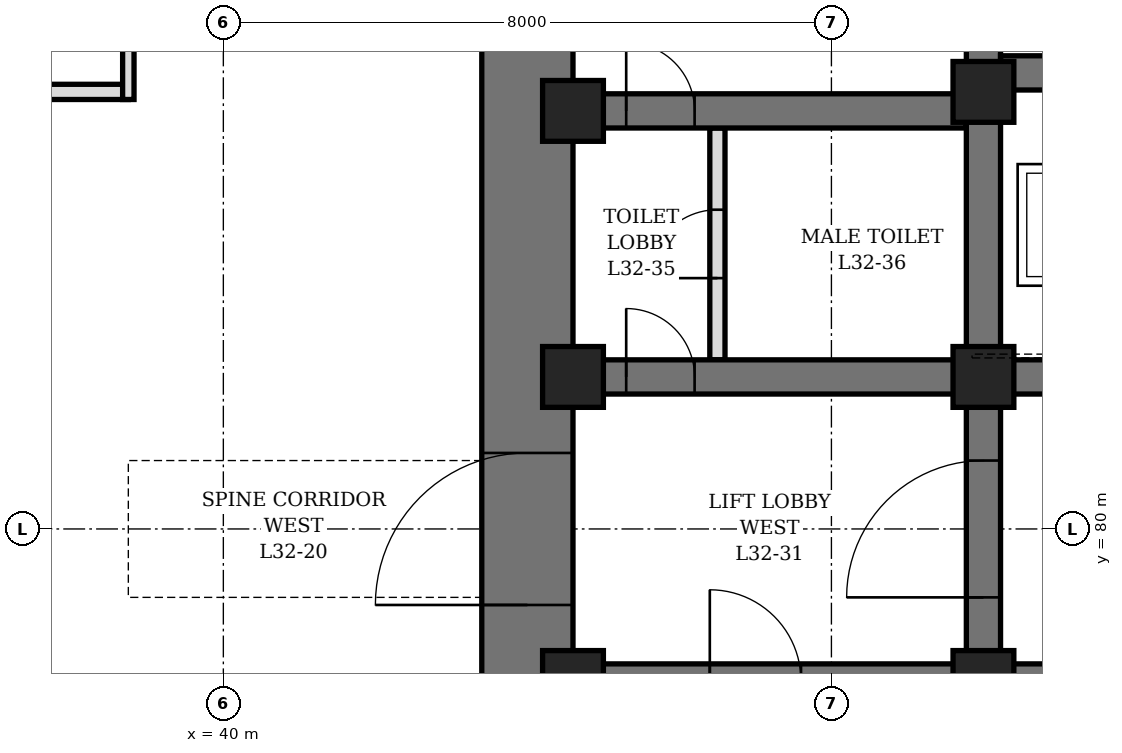
"""IFC4 building model, lengths in metres.
Left out: names, types, materials, properties, quantities, classifications, styles, units other than length and angle.
Written with IfcOpenShell. Run it as: python <this file> out.ifc"""

import sys

from ifc_helpers import new_model, si_unit, direction, frame, frame_2d, origin, origin_2d, place, context, subcontext, project, spatial, rectangle, hollow_rectangle, extrude, element, fill, save


model = new_model("IFC4")
c1 = context("Model", 3, precision=1e-05, world=origin(), true_north=direction((0.0, 1.0)))
c2 = subcontext(c1, "Body", "Model", "MODEL_VIEW")
j1 = project(units=[si_unit("LENGTHUNIT", "METRE"), si_unit("PLANEANGLEUNIT", "RADIAN")], contexts=[c1])
p1 = place(None, origin())
s1 = spatial("IfcSite", under=j1, at=p1, CompositionType="ELEMENT")
p2 = place(p1, origin())
s2 = spatial("IfcBuilding", under=s1, at=p2, CompositionType="ELEMENT")
p3 = place(p2, frame((0.0, 0.0, 145.9)))
s3 = spatial("IfcBuildingStorey", under=s2, at=p3, CompositionType="ELEMENT", Elevation=145.9)
p4 = place(p3, frame((44.0, 70.4, 0.0), z_axis=(0.0, 0.0, 1.0), x_axis=(0.0, 1.0, 0.0)))
e1 = element("IfcWall", 1, at=p4, inside=s3, PredefinedType="SHEAR", context=c2, shape_type="SweptSolid", body=[
    extrude(rectangle(XDim=19.2, YDim=1.2, at=frame_2d((9.6, 0.0))), origin(), (0.0, 0.0, 1.0), 4.2),
])
p5 = place(p4, frame((8.6, 0.0, 0.0)))
e2 = element("IfcOpeningElement", 2, at=p5, cuts=e1, PredefinedType="OPENING", context=c2, shape_type="SweptSolid", body=[
    extrude(rectangle(XDim=2.0, YDim=2.4, at=frame_2d((1.0, 1.2))), frame((0.0, 0.61, 0.0), z_axis=(0.0, -1.0, 0.0), x_axis=(1.0, 0.0, 0.0)), (0.0, 0.0, 1.0), 1.22),
])
p6 = place(p3, frame((50.0, 71.6, 0.0), z_axis=(0.0, 0.0, 1.0), x_axis=(0.0, 1.0, 0.0)))
e3 = element("IfcWall", 3, at=p6, inside=s3, PredefinedType="SHEAR", context=c2, shape_type="SweptSolid", body=[
    extrude(rectangle(XDim=16.8, YDim=0.45, at=frame_2d((8.4, 0.0))), origin(), (0.0, 0.0, 1.0), 4.2),
])
p7 = place(p6, frame((7.5, 0.0, 0.0)))
e4 = element("IfcOpeningElement", 4, at=p7, cuts=e3, PredefinedType="OPENING", context=c2, shape_type="SweptSolid", body=[
    extrude(rectangle(XDim=1.8, YDim=2.4, at=frame_2d((0.9, 1.2))), frame((0.0, 0.235, 0.0), z_axis=(0.0, -1.0, 0.0), x_axis=(1.0, 0.0, 0.0)), (0.0, 0.0, 1.0), 0.47),
])
p8 = place(p3, frame((44.6, 78.0, 0.0), z_axis=(0.0, 0.0, 1.0), x_axis=(1.0, 0.0, 0.0)))
e5 = element("IfcWall", 5, at=p8, inside=s3, PredefinedType="SHEAR", context=c2, shape_type="SweptSolid", body=[
    extrude(rectangle(XDim=5.175, YDim=0.45, at=frame_2d((2.587, 0.0))), origin(), (0.0, 0.0, 1.0), 4.2),
])
p9 = place(p8, frame((1.8, 0.0, 0.0)))
e6 = element("IfcOpeningElement", 6, at=p9, cuts=e5, PredefinedType="OPENING", context=c2, shape_type="SweptSolid", body=[
    extrude(rectangle(XDim=1.2, YDim=2.1, at=frame_2d((0.6, 1.05))), frame((0.0, 0.235, 0.0), z_axis=(0.0, -1.0, 0.0), x_axis=(1.0, 0.0, 0.0)), (0.0, 0.0, 1.0), 0.47),
])
p10 = place(p3, frame((44.6, 82.0, 0.0), z_axis=(0.0, 0.0, 1.0), x_axis=(1.0, 0.0, 0.0)))
e7 = element("IfcWall", 7, at=p10, inside=s3, PredefinedType="SHEAR", context=c2, shape_type="SweptSolid", body=[
    extrude(rectangle(XDim=5.175, YDim=0.45, at=frame_2d((2.587, 0.0))), origin(), (0.0, 0.0, 1.0), 4.2),
])
p11 = place(p10, frame((0.7, 0.0, 0.0)))
e8 = element("IfcOpeningElement", 8, at=p11, cuts=e7, PredefinedType="OPENING", context=c2, shape_type="SweptSolid", body=[
    extrude(rectangle(XDim=0.9, YDim=2.1, at=frame_2d((0.45, 1.05))), frame((0.0, 0.235, 0.0), z_axis=(0.0, -1.0, 0.0), x_axis=(1.0, 0.0, 0.0)), (0.0, 0.0, 1.0), 0.47),
])
p12 = place(p3, frame((44.6, 85.5, 0.0), z_axis=(0.0, 0.0, 1.0), x_axis=(1.0, 0.0, 0.0)))
e9 = element("IfcWall", 9, at=p12, inside=s3, PredefinedType="SHEAR", context=c2, shape_type="SweptSolid", body=[
    extrude(rectangle(XDim=5.175, YDim=0.45, at=frame_2d((2.587, 0.0))), origin(), (0.0, 0.0, 1.0), 4.2),
])
p13 = place(p12, frame((0.7, 0.0, 0.0)))
e10 = element("IfcOpeningElement", 10, at=p13, cuts=e9, PredefinedType="OPENING", context=c2, shape_type="SweptSolid", body=[
    extrude(rectangle(XDim=0.9, YDim=2.1, at=frame_2d((0.45, 1.05))), frame((0.0, 0.235, 0.0), z_axis=(0.0, -1.0, 0.0), x_axis=(1.0, 0.0, 0.0)), (0.0, 0.0, 1.0), 0.47),
])
p14 = place(p3, frame((50.225, 78.0, 0.0), z_axis=(0.0, 0.0, 1.0), x_axis=(1.0, 0.0, 0.0)))
e11 = element("IfcWall", 11, at=p14, inside=s3, PredefinedType="SHEAR", context=c2, shape_type="SweptSolid", body=[
    extrude(rectangle(XDim=11.55, YDim=0.45, at=frame_2d((5.775, 0.0))), origin(), (0.0, 0.0, 1.0), 4.2),
])
p15 = place(p14, frame((0.825, 0.0, 0.0)))
e12 = element("IfcOpeningElement", 12, at=p15, cuts=e11, PredefinedType="OPENING", context=c2, shape_type="SweptSolid", body=[
    extrude(rectangle(XDim=0.9, YDim=2.1, at=frame_2d((0.45, 1.05))), frame((0.0, 0.235, 0.0), z_axis=(0.0, -1.0, 0.0), x_axis=(1.0, 0.0, 0.0)), (0.0, 0.0, 1.0), 0.47),
])
p16 = place(p14, frame((3.825, 0.0, 0.0)))
e13 = element("IfcOpeningElement", 13, at=p16, cuts=e11, PredefinedType="OPENING", context=c2, shape_type="SweptSolid", body=[
    extrude(rectangle(XDim=0.9, YDim=2.1, at=frame_2d((0.45, 1.05))), frame((0.0, 0.235, 0.0), z_axis=(0.0, -1.0, 0.0), x_axis=(1.0, 0.0, 0.0)), (0.0, 0.0, 1.0), 0.47),
])
p17 = place(p14, frame((6.825, 0.0, 0.0)))
e14 = element("IfcOpeningElement", 14, at=p17, cuts=e11, PredefinedType="OPENING", context=c2, shape_type="SweptSolid", body=[
    extrude(rectangle(XDim=0.9, YDim=2.1, at=frame_2d((0.45, 1.05))), frame((0.0, 0.235, 0.0), z_axis=(0.0, -1.0, 0.0), x_axis=(1.0, 0.0, 0.0)), (0.0, 0.0, 1.0), 0.47),
])
p18 = place(p14, frame((9.825, 0.0, 0.0)))
e15 = element("IfcOpeningElement", 15, at=p18, cuts=e11, PredefinedType="OPENING", context=c2, shape_type="SweptSolid", body=[
    extrude(rectangle(XDim=0.9, YDim=2.1, at=frame_2d((0.45, 1.05))), frame((0.0, 0.235, 0.0), z_axis=(0.0, -1.0, 0.0), x_axis=(1.0, 0.0, 0.0)), (0.0, 0.0, 1.0), 0.47),
])
p19 = place(p3, frame((50.225, 82.0, 0.0), z_axis=(0.0, 0.0, 1.0), x_axis=(1.0, 0.0, 0.0)))
e16 = element("IfcWall", 16, at=p19, inside=s3, PredefinedType="SHEAR", context=c2, shape_type="SweptSolid", body=[
    extrude(rectangle(XDim=11.55, YDim=0.45, at=frame_2d((5.775, 0.0))), origin(), (0.0, 0.0, 1.0), 4.2),
])
p20 = place(p19, frame((0.725, 0.0, 0.0)))
e17 = element("IfcOpeningElement", 17, at=p20, cuts=e16, PredefinedType="OPENING", context=c2, shape_type="SweptSolid", body=[
    extrude(rectangle(XDim=1.1, YDim=2.2, at=frame_2d((0.55, 1.1))), frame((0.0, 0.235, 0.0), z_axis=(0.0, -1.0, 0.0), x_axis=(1.0, 0.0, 0.0)), (0.0, 0.0, 1.0), 0.47),
])
p21 = place(p19, frame((3.725, 0.0, 0.0)))
e18 = element("IfcOpeningElement", 18, at=p21, cuts=e16, PredefinedType="OPENING", context=c2, shape_type="SweptSolid", body=[
    extrude(rectangle(XDim=1.1, YDim=2.2, at=frame_2d((0.55, 1.1))), frame((0.0, 0.235, 0.0), z_axis=(0.0, -1.0, 0.0), x_axis=(1.0, 0.0, 0.0)), (0.0, 0.0, 1.0), 0.47),
])
p22 = place(p19, frame((6.725, 0.0, 0.0)))
e19 = element("IfcOpeningElement", 19, at=p22, cuts=e16, PredefinedType="OPENING", context=c2, shape_type="SweptSolid", body=[
    extrude(rectangle(XDim=1.1, YDim=2.2, at=frame_2d((0.55, 1.1))), frame((0.0, 0.235, 0.0), z_axis=(0.0, -1.0, 0.0), x_axis=(1.0, 0.0, 0.0)), (0.0, 0.0, 1.0), 0.47),
])
p23 = place(p19, frame((9.725, 0.0, 0.0)))
e20 = element("IfcOpeningElement", 20, at=p23, cuts=e16, PredefinedType="OPENING", context=c2, shape_type="SweptSolid", body=[
    extrude(rectangle(XDim=1.1, YDim=2.2, at=frame_2d((0.55, 1.1))), frame((0.0, 0.235, 0.0), z_axis=(0.0, -1.0, 0.0), x_axis=(1.0, 0.0, 0.0)), (0.0, 0.0, 1.0), 0.47),
])
p24 = place(p3, frame((50.225, 86.0, 0.0), z_axis=(0.0, 0.0, 1.0), x_axis=(1.0, 0.0, 0.0)))
e21 = element("IfcWall", 21, at=p24, inside=s3, PredefinedType="SHEAR", context=c2, shape_type="SweptSolid", body=[
    extrude(rectangle(XDim=11.55, YDim=0.45, at=frame_2d((5.775, 0.0))), origin(), (0.0, 0.0, 1.0), 4.2),
])
for number, where, z_axis, x_axis in (
    (22, (44.6, 78.0, 0.0), (0.0, 0.0, 1.0), (1.0, 0.0, 0.0)),
    (23, (44.6, 82.0, 0.0), (0.0, 0.0, 1.0), (1.0, 0.0, 0.0)),
    (24, (44.6, 85.5, 0.0), (0.0, 0.0, 1.0), (1.0, 0.0, 0.0)),
    (25, (50.0, 78.0, 0.0), (0.0, 0.0, 1.0), (1.0, 0.0, 0.0)),
    (26, (50.0, 82.0, 0.0), (0.0, 0.0, 1.0), (1.0, 0.0, 0.0)),
    (27, (50.0, 85.75, 0.0), (0.0, 0.0, 1.0), (1.0, 0.0, 0.0)),
):
    element("IfcColumn", number, at=place(p3, frame(where, z_axis=z_axis, x_axis=x_axis)), inside=s3, PredefinedType="COLUMN", context=c2, shape_type="SweptSolid", body=[
        extrude(hollow_rectangle(XDim=0.8, YDim=0.8, WallThickness=0.1, at=origin_2d()), origin(), (0.0, 0.0, 1.0), 4.2),
    ])
p25 = place(p3, frame((46.5, 82.225, 0.0), z_axis=(0.0, 0.0, 1.0), x_axis=(0.0, 1.0, 0.0)))
e28 = element("IfcWall", 28, at=p25, inside=s3, PredefinedType="PARTITIONING", context=c2, shape_type="SweptSolid", body=[
    extrude(rectangle(XDim=3.05, YDim=0.2, at=frame_2d((1.525, 0.0))), origin(), (0.0, 0.0, 1.0), 4.04),
])
p26 = place(p25, frame((1.075, 0.0, 0.0)))
e29 = element("IfcOpeningElement", 29, at=p26, cuts=e28, PredefinedType="OPENING", context=c2, shape_type="SweptSolid", body=[
    extrude(rectangle(XDim=0.9, YDim=2.1, at=frame_2d((0.45, 1.05))), frame((0.0, 0.11, 0.0), z_axis=(0.0, -1.0, 0.0), x_axis=(1.0, 0.0, 0.0)), (0.0, 0.0, 1.0), 0.22),
])
p27 = place(p3, frame((33.95, 85.75, 0.0), z_axis=(0.0, 0.0, 1.0), x_axis=(1.0, 0.0, 0.0)))
e30 = element("IfcWall", 30, at=p27, inside=s3, PredefinedType="PARTITIONING", context=c2, shape_type="SweptSolid", body=[
    extrude(rectangle(XDim=4.8, YDim=0.2, at=frame_2d((2.4, 0.0))), origin(), (0.0, 0.0, 1.0), 3.428),
])
p28 = place(p3, frame((38.75, 85.65, 0.0), z_axis=(0.0, 0.0, 1.0), x_axis=(0.0, 1.0, 0.0)))
e31 = element("IfcWall", 31, at=p28, inside=s3, PredefinedType="PARTITIONING", context=c2, shape_type="SweptSolid", body=[
    extrude(rectangle(XDim=5.85, YDim=0.15, at=frame_2d((2.925, 0.0))), origin(), (0.0, 0.0, 1.0), 4.04),
])
p29 = place(p28, frame((1.038, 0.0, 0.0)))
e32 = element("IfcOpeningElement", 32, at=p29, cuts=e31, PredefinedType="OPENING", context=c2, shape_type="SweptSolid", body=[
    extrude(rectangle(XDim=1.0, YDim=2.1, at=frame_2d((0.5, 1.05))), frame((0.0, 0.085, 0.0), z_axis=(0.0, -1.0, 0.0), x_axis=(1.0, 0.0, 0.0)), (0.0, 0.0, 1.0), 0.17),
])
p30 = place(p11, origin())
e33 = element("IfcDoor", 33, at=p30, inside=s3, OperationType="SINGLE_SWING_LEFT", PredefinedType="DOOR", context=c2, shape_type="SweptSolid", body=[
    extrude(rectangle(XDim=0.9, YDim=2.1, at=frame_2d((0.45, 1.05))), frame((0.0, 0.225, 0.0), z_axis=(0.0, -1.0, 0.0), x_axis=(1.0, 0.0, 0.0)), (0.0, 0.0, 1.0), 0.449),
])
fill(e8, e33)
p31 = place(p26, origin())
e34 = element("IfcDoor", 34, at=p31, inside=s3, OperationType="SINGLE_SWING_RIGHT", PredefinedType="DOOR", context=c2, shape_type="SweptSolid", body=[
    extrude(rectangle(XDim=0.9, YDim=2.1, at=frame_2d((0.45, 1.05))), frame((0.0, 0.1, 0.0), z_axis=(0.0, -1.0, 0.0), x_axis=(1.0, 0.0, 0.0)), (0.0, 0.0, 1.0), 0.199),
])
fill(e29, e34)
p32 = place(p13, origin())
e35 = element("IfcDoor", 35, at=p32, inside=s3, OperationType="SINGLE_SWING_RIGHT", PredefinedType="DOOR", context=c2, shape_type="SweptSolid", body=[
    extrude(rectangle(XDim=0.9, YDim=2.1, at=frame_2d((0.45, 1.05))), frame((0.0, 0.225, 0.0), z_axis=(0.0, -1.0, 0.0), x_axis=(1.0, 0.0, 0.0)), (0.0, 0.0, 1.0), 0.449),
])
fill(e10, e35)
p33 = place(p9, origin())
e36 = element("IfcDoor", 36, at=p33, inside=s3, OperationType="SINGLE_SWING_LEFT", PredefinedType="DOOR", context=c2, shape_type="SweptSolid", body=[
    extrude(rectangle(XDim=1.2, YDim=2.1, at=frame_2d((0.6, 1.05))), frame((0.0, 0.225, 0.0), z_axis=(0.0, -1.0, 0.0), x_axis=(1.0, 0.0, 0.0)), (0.0, 0.0, 1.0), 0.449),
])
fill(e6, e36)
p34 = place(p5, origin())
e37 = element("IfcDoor", 37, at=p34, inside=s3, OperationType="DOUBLE_DOOR_SINGLE_SWING", PredefinedType="DOOR", context=c2, shape_type="SweptSolid", body=[
    extrude(rectangle(XDim=2.0, YDim=2.4, at=frame_2d((1.0, 1.2))), frame((0.0, 0.35, 0.0), z_axis=(0.0, -1.0, 0.0), x_axis=(1.0, 0.0, 0.0)), (0.0, 0.0, 1.0), 0.7),
])
fill(e2, e37)
p35 = place(p7, origin())
e38 = element("IfcDoor", 38, at=p35, inside=s3, OperationType="DOUBLE_DOOR_SINGLE_SWING", PredefinedType="DOOR", context=c2, shape_type="SweptSolid", body=[
    extrude(rectangle(XDim=1.8, YDim=2.4, at=frame_2d((0.9, 1.2))), frame((0.0, 0.225, 0.0), z_axis=(0.0, -1.0, 0.0), x_axis=(1.0, 0.0, 0.0)), (0.0, 0.0, 1.0), 0.449),
])
fill(e4, e38)
save(model, sys.argv[1])
